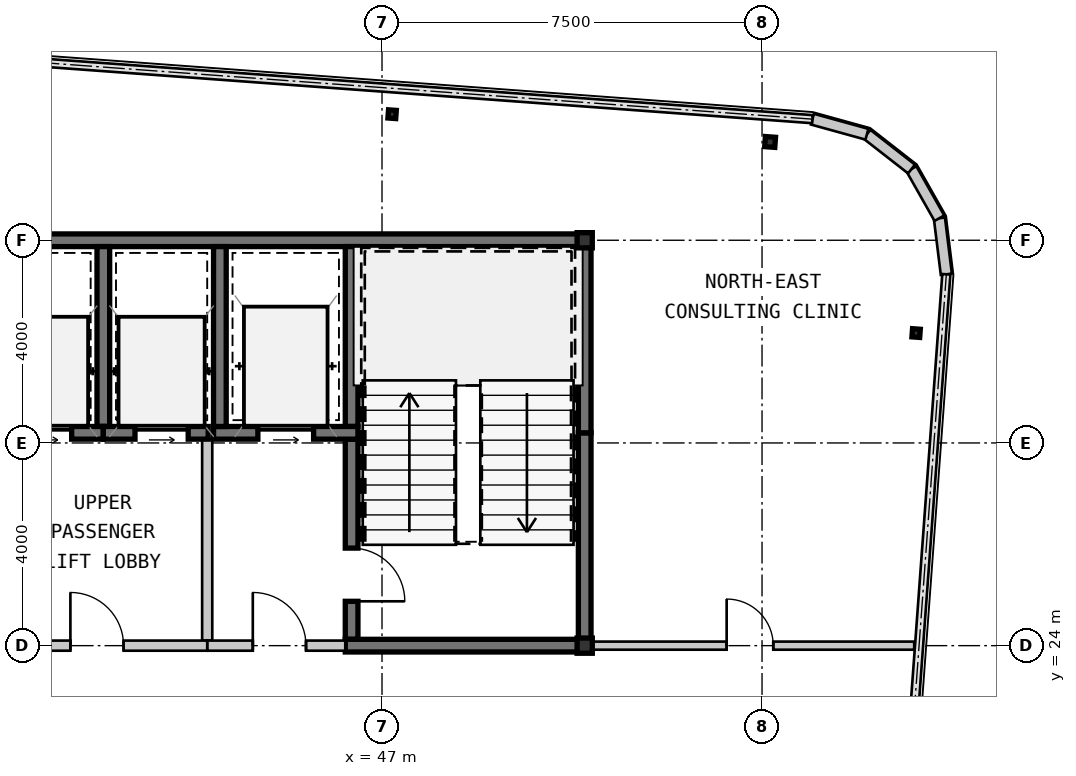
"""IFC4 building model, lengths in metres.
Left out: names, types, materials, properties, quantities, classifications, styles, units other than length and angle.
Written with IfcOpenShell. Run it as: python <this file> out.ifc"""

import sys

from ifc_helpers import new_model, si_unit, direction, frame, frame_2d, origin, origin_2d, place, context, subcontext, project, spatial, rectangle, hollow_rectangle, i_section, extrude, source, transform, mapped, element, fill, save


model = new_model("IFC4")
c1 = context("Model", 3, precision=1e-05, world=origin(), true_north=direction((0.0, 1.0)))
c2 = subcontext(c1, "Body", "Model", "MODEL_VIEW")
j1 = project(units=[si_unit("LENGTHUNIT", "METRE"), si_unit("PLANEANGLEUNIT", "RADIAN")], contexts=[c1])
p1 = place(None, origin())
s1 = spatial("IfcSite", under=j1, at=p1, CompositionType="ELEMENT")
p2 = place(p1, origin())
s2 = spatial("IfcBuilding", under=s1, at=p2, CompositionType="ELEMENT")
p3 = place(p2, frame((0.0, 0.0, 220.85)))
s3 = spatial("IfcBuildingStorey", under=s2, at=p3, CompositionType="ELEMENT", Elevation=220.85)
m1 = source(origin(), c2, "Body", "SweptSolid", [
    extrude(hollow_rectangle(XDim=0.3, YDim=0.3, WallThickness=0.012, at=origin_2d()), origin(), (0.0, 0.0, 1.0), 3.15),
])
for number, where, z_axis, x_axis in (
    (1, (51.0, 24.0, 0.0), (0.0, 0.0, 1.0), (1.0, 0.0, 0.0)),
    (2, (51.0, 32.0, 0.0), (0.0, 0.0, 1.0), (1.0, 0.0, 0.0)),
):
    element("IfcColumn", number, at=place(p3, frame(where, z_axis=z_axis, x_axis=x_axis)), inside=s3, PredefinedType="COLUMN", context=c2, shape_type="MappedRepresentation", body=[
        mapped(m1, transform((0.0, 0.0, 0.0), scale=1.0)),
    ])
m2 = source(origin(), c2, "Body", "SweptSolid", [
    extrude(i_section(OverallWidth=0.154, OverallDepth=0.162, WebThickness=0.008, FlangeThickness=0.011, at=origin_2d()), origin(), (0.0, 0.0, 1.0), 3.15),
])
p4 = place(p3, frame((47.199, 34.488, 0.0), z_axis=(0.0, 0.0, 1.0), x_axis=(0.997314477224, -0.073238197128, 0.0)))
e3 = element("IfcColumn", 3, at=p4, inside=s3, PredefinedType="COLUMN", context=c2, shape_type="MappedRepresentation", body=[
    mapped(m2, transform((0.0, 0.0, 0.0), scale=1.0)),
])
m3 = source(origin(), c2, "Body", "SweptSolid", [
    extrude(hollow_rectangle(XDim=0.2, YDim=0.2, WallThickness=0.009, at=origin_2d()), origin(), (0.0, 0.0, 1.0), 3.15),
])
p5 = place(p3, frame((54.659, 33.94, 0.0), z_axis=(0.0, 0.0, 1.0), x_axis=(0.997314477224, -0.073238197128, 0.0)))
e4 = element("IfcColumn", 4, at=p5, inside=s3, PredefinedType="COLUMN", context=c2, shape_type="MappedRepresentation", body=[
    mapped(m3, transform((0.0, 0.0, 0.0), scale=1.0)),
])
p6 = place(p3, frame((57.541, 30.169, 0.0), z_axis=(0.0, 0.0, 1.0), x_axis=(0.997314477224, -0.073238197128, 0.0)))
e5 = element("IfcColumn", 5, at=p6, inside=s3, PredefinedType="COLUMN", context=c2, shape_type="MappedRepresentation", body=[
    mapped(m2, transform((0.0, 0.0, 0.0), scale=1.0)),
])
m4 = source(origin(), c2, "Body", "SweptSolid", [
    extrude(rectangle(XDim=1.116, YDim=0.22, at=frame_2d((0.558, 0.0))), origin(), (0.0, 0.0, 1.0), 2.93),
])
p7 = place(p3, frame((58.137, 31.328, 0.0), z_axis=(0.0, 0.0, 1.0), x_axis=(-0.122742076028, 0.992438604032, 0.0)))
e6 = element("IfcWall", 6, at=p7, inside=s3, PredefinedType="SOLIDWALL", context=c2, shape_type="MappedRepresentation", body=[
    mapped(m4, transform((0.0, 0.0, 0.0), scale=1.0)),
])
m5 = source(origin(), c2, "Body", "SweptSolid", [
    extrude(rectangle(XDim=1.116, YDim=0.22, at=frame_2d((0.558, 0.0))), origin(), (0.0, 0.0, 1.0), 2.93),
])
p8 = place(p3, frame((58.0, 32.436, 0.0), z_axis=(0.0, 0.0, 1.0), x_axis=(-0.493167138628, 0.869934579941, 0.0)))
e7 = element("IfcWall", 7, at=p8, inside=s3, PredefinedType="SOLIDWALL", context=c2, shape_type="MappedRepresentation", body=[
    mapped(m5, transform((0.0, 0.0, 0.0), scale=1.0)),
])
p9 = place(p3, frame((57.45, 33.406, 0.0), z_axis=(0.0, 0.0, 1.0), x_axis=(-0.788597772321, 0.614909386406, 0.0)))
e8 = element("IfcWall", 8, at=p9, inside=s3, PredefinedType="SOLIDWALL", context=c2, shape_type="MappedRepresentation", body=[
    mapped(m4, transform((0.0, 0.0, 0.0), scale=1.0)),
])
p10 = place(p3, frame((56.57, 34.093, 0.0), z_axis=(0.0, 0.0, 1.0), x_axis=(-0.963833843713, 0.266503886865, 0.0)))
e9 = element("IfcWall", 9, at=p10, inside=s3, PredefinedType="SOLIDWALL", context=c2, shape_type="MappedRepresentation", body=[
    mapped(m5, transform((0.0, 0.0, 0.0), scale=1.0)),
])
m6 = source(origin(), c2, "Body", "SweptSolid", [
    extrude(rectangle(XDim=11.925, YDim=0.25, at=frame_2d((5.962, 0.0))), origin(), (0.0, 0.0, 1.0), 2.93),
])
p11 = place(p3, frame((39.2, 32.0, 0.0), z_axis=(0.0, 0.0, 1.0), x_axis=(1.0, 0.0, 0.0)))
e10 = element("IfcWall", 10, at=p11, inside=s3, PredefinedType="SHEAR", context=c2, shape_type="MappedRepresentation", body=[
    mapped(m6, transform((0.0, 0.0, 0.0), scale=1.0)),
])
m7 = source(origin(), c2, "Body", "SweptSolid", [
    extrude(rectangle(XDim=4.075, YDim=0.25, at=frame_2d((2.038, 0.0))), origin(), (0.0, 0.0, 1.0), 2.93),
])
p12 = place(p3, frame((51.0, 24.125, 0.0), z_axis=(0.0, 0.0, 1.0), x_axis=(0.0, 1.0, 0.0)))
e11 = element("IfcWall", 11, at=p12, inside=s3, PredefinedType="SHEAR", context=c2, shape_type="MappedRepresentation", body=[
    mapped(m7, transform((0.0, 0.0, 0.0), scale=1.0)),
])
m8 = source(origin(), c2, "Body", "SweptSolid", [
    extrude(rectangle(XDim=3.675, YDim=0.25, at=frame_2d((1.837, 0.0))), origin(), (0.0, 0.0, 1.0), 2.93),
])
p13 = place(p3, frame((51.0, 28.2, 0.0), z_axis=(0.0, 0.0, 1.0), x_axis=(0.0, 1.0, 0.0)))
e12 = element("IfcWall", 12, at=p13, inside=s3, PredefinedType="SHEAR", context=c2, shape_type="MappedRepresentation", body=[
    mapped(m8, transform((0.0, 0.0, 0.0), scale=1.0)),
])
m9 = source(origin(), c2, "Body", "SweptSolid", [
    extrude(rectangle(XDim=3.55, YDim=0.25, at=frame_2d((1.775, 0.0))), origin(), (0.0, 0.0, 1.0), 2.93),
])
p14 = place(p3, frame((46.4, 31.875, 0.0), z_axis=(0.0, 0.0, 1.0), x_axis=(0.0, -1.0, 0.0)))
e13 = element("IfcWall", 13, at=p14, inside=s3, PredefinedType="SHEAR", context=c2, shape_type="MappedRepresentation", body=[
    mapped(m9, transform((0.0, 0.0, 0.0), scale=1.0)),
])
m10 = source(origin(), c2, "Body", "SweptSolid", [
    extrude(rectangle(XDim=3.95, YDim=0.25, at=frame_2d((1.975, 0.0))), origin(), (0.0, 0.0, 1.0), 2.93),
])
p15 = place(p3, frame((46.4, 28.075, 0.0), z_axis=(0.0, 0.0, 1.0), x_axis=(0.0, -1.0, 0.0)))
e14 = element("IfcWall", 14, at=p15, inside=s3, PredefinedType="SHEAR", context=c2, shape_type="MappedRepresentation", body=[
    mapped(m10, transform((0.0, 0.0, 0.0), scale=1.0)),
])
m11 = source(origin(), c2, "Body", "SweptSolid", [
    extrude(rectangle(XDim=1.05, YDim=2.1, at=frame_2d((0.525, 1.05))), frame((0.0, 0.135, 0.0), z_axis=(0.0, -1.0, 0.0), x_axis=(1.0, 0.0, 0.0)), (0.0, 0.0, 1.0), 0.27),
])
p16 = place(p15, frame((2.15, 0.0, 0.0)))
e15 = element("IfcOpeningElement", 15, at=p16, cuts=e14, PredefinedType="OPENING", context=c2, shape_type="MappedRepresentation", body=[
    mapped(m11, transform((0.0, 0.0, 0.0), scale=1.0)),
])
m12 = source(origin(), c2, "Body", "SweptSolid", [
    extrude(rectangle(XDim=4.85, YDim=0.25, at=frame_2d((2.425, 0.0))), origin(), (0.0, 0.0, 1.0), 2.93),
])
p17 = place(p3, frame((46.275, 24.0, 0.0), z_axis=(0.0, 0.0, 1.0), x_axis=(1.0, 0.0, 0.0)))
e16 = element("IfcWall", 16, at=p17, inside=s3, PredefinedType="SHEAR", context=c2, shape_type="MappedRepresentation", body=[
    mapped(m12, transform((0.0, 0.0, 0.0), scale=1.0)),
])
m13 = source(origin(), c2, "Body", "SweptSolid", [
    extrude(rectangle(XDim=2.85, YDim=0.25, at=frame_2d((1.425, 0.0))), origin(), (0.0, 0.0, 1.0), 2.93),
])
p18 = place(p3, frame((43.675, 28.2, 0.0), z_axis=(0.0, 0.0, 1.0), x_axis=(1.0, 0.0, 0.0)))
e17 = element("IfcWall", 17, at=p18, inside=s3, PredefinedType="SHEAR", context=c2, shape_type="MappedRepresentation", body=[
    mapped(m13, transform((0.0, 0.0, 0.0), scale=1.0)),
])
m14 = source(origin(), c2, "Body", "SweptSolid", [
    extrude(rectangle(XDim=1.1, YDim=2.15, at=frame_2d((0.55, 1.075))), frame((0.0, 0.135, 0.0), z_axis=(0.0, -1.0, 0.0), x_axis=(1.0, 0.0, 0.0)), (0.0, 0.0, 1.0), 0.27),
])
p19 = place(p18, frame((0.875, 0.0, 0.0)))
e18 = element("IfcOpeningElement", 18, at=p19, cuts=e17, PredefinedType="OPENING", context=c2, shape_type="MappedRepresentation", body=[
    mapped(m14, transform((0.0, 0.0, 0.0), scale=1.0)),
])
p20 = place(p3, frame((43.8, 31.875, 0.0), z_axis=(0.0, 0.0, 1.0), x_axis=(0.0, -1.0, 0.0)))
e19 = element("IfcWall", 19, at=p20, inside=s3, PredefinedType="SHEAR", context=c2, shape_type="MappedRepresentation", body=[
    mapped(m9, transform((0.0, 0.0, 0.0), scale=1.0)),
])
m15 = source(origin(), c2, "Body", "SweptSolid", [
    extrude(rectangle(XDim=3.975, YDim=0.2, at=frame_2d((1.987, 0.0))), origin(), (0.0, 0.0, 1.0), 2.93),
])
p21 = place(p3, frame((43.55, 28.075, 0.0), z_axis=(0.0, 0.0, 1.0), x_axis=(0.0, -1.0, 0.0)))
e20 = element("IfcWall", 20, at=p21, inside=s3, PredefinedType="SOLIDWALL", context=c2, shape_type="MappedRepresentation", body=[
    mapped(m15, transform((0.0, 0.0, 0.0), scale=1.0)),
])
m16 = source(origin(), c2, "Body", "SweptSolid", [
    extrude(rectangle(XDim=2.725, YDim=0.2, at=frame_2d((1.362, 0.0))), origin(), (0.0, 0.0, 1.0), 2.397),
])
p22 = place(p3, frame((43.55, 24.0, 0.0), z_axis=(0.0, 0.0, 1.0), x_axis=(1.0, 0.0, 0.0)))
e21 = element("IfcWall", 21, at=p22, inside=s3, PredefinedType="SOLIDWALL", context=c2, shape_type="MappedRepresentation", body=[
    mapped(m16, transform((0.0, 0.0, 0.0), scale=1.0)),
])
m17 = source(origin(), c2, "Body", "SweptSolid", [
    extrude(rectangle(XDim=1.05, YDim=2.1, at=frame_2d((0.525, 1.05))), frame((0.0, 0.11, 0.0), z_axis=(0.0, -1.0, 0.0), x_axis=(1.0, 0.0, 0.0)), (0.0, 0.0, 1.0), 0.22),
])
p23 = place(p22, frame((0.9, 0.0, 0.0)))
e22 = element("IfcOpeningElement", 22, at=p23, cuts=e21, PredefinedType="OPENING", context=c2, shape_type="MappedRepresentation", body=[
    mapped(m17, transform((0.0, 0.0, 0.0), scale=1.0)),
])
p24 = place(p3, frame((41.5, 28.325, 0.0), z_axis=(0.0, 0.0, 1.0), x_axis=(0.0, 1.0, 0.0)))
e23 = element("IfcWall", 23, at=p24, inside=s3, PredefinedType="SHEAR", context=c2, shape_type="MappedRepresentation", body=[
    mapped(m9, transform((0.0, 0.0, 0.0), scale=1.0)),
])
m18 = source(origin(), c2, "Body", "SweptSolid", [
    extrude(rectangle(XDim=2.425, YDim=0.25, at=frame_2d((1.212, 0.0))), origin(), (0.0, 0.0, 1.0), 2.93),
])
p25 = place(p3, frame((39.075, 28.2, 0.0), z_axis=(0.0, 0.0, 1.0), x_axis=(1.0, 0.0, 0.0)))
e24 = element("IfcWall", 24, at=p25, inside=s3, PredefinedType="SHEAR", context=c2, shape_type="MappedRepresentation", body=[
    mapped(m18, transform((0.0, 0.0, 0.0), scale=1.0)),
])
m19 = source(origin(), c2, "Body", "SweptSolid", [
    extrude(rectangle(XDim=1.05, YDim=2.15, at=frame_2d((0.525, 1.075))), frame((0.0, 0.135, 0.0), z_axis=(0.0, -1.0, 0.0), x_axis=(1.0, 0.0, 0.0)), (0.0, 0.0, 1.0), 0.27),
])
p26 = place(p25, frame((0.75, 0.0, 0.0)))
e25 = element("IfcOpeningElement", 25, at=p26, cuts=e24, PredefinedType="OPENING", context=c2, shape_type="MappedRepresentation", body=[
    mapped(m19, transform((0.0, 0.0, 0.0), scale=1.0)),
])
m20 = source(origin(), c2, "Body", "SweptSolid", [
    extrude(rectangle(XDim=2.07, YDim=0.25, at=frame_2d((1.035, 0.0))), origin(), (0.0, 0.0, 1.0), 2.93),
])
p27 = place(p3, frame((41.5, 28.2, 0.0), z_axis=(0.0, 0.0, 1.0), x_axis=(1.0, 0.0, 0.0)))
e26 = element("IfcWall", 26, at=p27, inside=s3, PredefinedType="SHEAR", context=c2, shape_type="MappedRepresentation", body=[
    mapped(m20, transform((0.0, 0.0, 0.0), scale=1.0)),
])
p28 = place(p27, frame((0.625, 0.0, 0.0)))
e27 = element("IfcOpeningElement", 27, at=p28, cuts=e26, PredefinedType="OPENING", context=c2, shape_type="MappedRepresentation", body=[
    mapped(m19, transform((0.0, 0.0, 0.0), scale=1.0)),
])
m21 = source(origin(), c2, "Body", "SweptSolid", [
    extrude(rectangle(XDim=4.35, YDim=0.2, at=frame_2d((2.175, 0.0))), origin(), (0.0, 0.0, 1.0), 2.397),
])
p29 = place(p3, frame((43.55, 24.0, 0.0), z_axis=(0.0, 0.0, 1.0), x_axis=(-1.0, 0.0, 0.0)))
e28 = element("IfcWall", 28, at=p29, inside=s3, PredefinedType="SOLIDWALL", context=c2, shape_type="MappedRepresentation", body=[
    mapped(m21, transform((0.0, 0.0, 0.0), scale=1.0)),
])
p30 = place(p29, frame((1.65, 0.0, 0.0)))
e29 = element("IfcOpeningElement", 29, at=p30, cuts=e28, PredefinedType="OPENING", context=c2, shape_type="MappedRepresentation", body=[
    mapped(m17, transform((0.0, 0.0, 0.0), scale=1.0)),
])
m22 = source(origin(), c2, "Body", "SweptSolid", [
    extrude(rectangle(XDim=6.378, YDim=0.16, at=frame_2d((3.189, 0.0))), origin(), (0.0, 0.0, 1.0), 2.93),
])
p31 = place(p3, frame((51.125, 24.0, 0.0), z_axis=(0.0, 0.0, 1.0), x_axis=(1.0, 0.0, 0.0)))
e30 = element("IfcWall", 30, at=p31, inside=s3, PredefinedType="PARTITIONING", context=c2, shape_type="MappedRepresentation", body=[
    mapped(m22, transform((0.0, 0.0, 0.0), scale=1.0)),
])
m23 = source(origin(), c2, "Body", "SweptSolid", [
    extrude(rectangle(XDim=0.92, YDim=2.1, at=frame_2d((0.46, 1.05))), frame((0.0, 0.09, 0.0), z_axis=(0.0, -1.0, 0.0), x_axis=(1.0, 0.0, 0.0)), (0.0, 0.0, 1.0), 0.18),
])
p32 = place(p31, frame((2.677, 0.0, 0.0)))
e31 = element("IfcOpeningElement", 31, at=p32, cuts=e30, PredefinedType="OPENING", context=c2, shape_type="MappedRepresentation", body=[
    mapped(m23, transform((0.0, 0.0, 0.0), scale=1.0)),
])
m24 = source(origin(), c2, "Body", "SweptSolid", [
    extrude(rectangle(XDim=1.05, YDim=2.1, at=frame_2d((0.525, 1.05))), frame((0.0, 0.025, 0.0), z_axis=(0.0, -1.0, 0.0), x_axis=(1.0, 0.0, 0.0)), (0.0, 0.0, 1.0), 0.05),
])
p33 = place(p16, origin())
e32 = element("IfcDoor", 32, at=p33, inside=s3, OperationType="SINGLE_SWING_RIGHT", PredefinedType="DOOR", context=c2, shape_type="MappedRepresentation", body=[
    mapped(m24, transform((0.0, 0.0, 0.0), scale=1.0)),
])
fill(e15, e32)
m25 = source(origin(), c2, "Body", "SweptSolid", [
    extrude(rectangle(XDim=1.1, YDim=2.15, at=frame_2d((0.55, 1.075))), frame((0.0, 0.025, 0.0), z_axis=(0.0, -1.0, 0.0), x_axis=(1.0, 0.0, 0.0)), (0.0, 0.0, 1.0), 0.05),
])
p34 = place(p19, origin())
e33 = element("IfcDoor", 33, at=p34, inside=s3, OperationType="SLIDING_TO_LEFT", PredefinedType="DOOR", context=c2, shape_type="MappedRepresentation", body=[
    mapped(m25, transform((0.0, 0.0, 0.0), scale=1.0)),
])
fill(e18, e33)
p35 = place(p23, origin())
e34 = element("IfcDoor", 34, at=p35, inside=s3, OperationType="SINGLE_SWING_LEFT", PredefinedType="DOOR", context=c2, shape_type="MappedRepresentation", body=[
    mapped(m24, transform((0.0, 0.0, 0.0), scale=1.0)),
])
fill(e22, e34)
m26 = source(origin(), c2, "Body", "SweptSolid", [
    extrude(rectangle(XDim=1.05, YDim=2.15, at=frame_2d((0.525, 1.075))), frame((0.0, 0.025, 0.0), z_axis=(0.0, -1.0, 0.0), x_axis=(1.0, 0.0, 0.0)), (0.0, 0.0, 1.0), 0.05),
])
p36 = place(p26, origin())
e35 = element("IfcDoor", 35, at=p36, inside=s3, OperationType="SLIDING_TO_LEFT", PredefinedType="DOOR", context=c2, shape_type="MappedRepresentation", body=[
    mapped(m26, transform((0.0, 0.0, 0.0), scale=1.0)),
])
fill(e25, e35)
p37 = place(p28, origin())
e36 = element("IfcDoor", 36, at=p37, inside=s3, OperationType="SLIDING_TO_LEFT", PredefinedType="DOOR", context=c2, shape_type="MappedRepresentation", body=[
    mapped(m26, transform((0.0, 0.0, 0.0), scale=1.0)),
])
fill(e27, e36)
p38 = place(p30, frame((1.05, 0.0, 0.0), z_axis=(0.0, 0.0, 1.0), x_axis=(-1.0, 0.0, 0.0)))
e37 = element("IfcDoor", 37, at=p38, inside=s3, OperationType="SINGLE_SWING_LEFT", PredefinedType="DOOR", context=c2, shape_type="MappedRepresentation", body=[
    mapped(m24, transform((0.0, 0.0, 0.0), scale=1.0)),
])
fill(e29, e37)
m27 = source(origin(), c2, "Body", "SweptSolid", [
    extrude(rectangle(XDim=0.92, YDim=2.1, at=frame_2d((0.46, 1.05))), frame((0.0, 0.025, 0.0), z_axis=(0.0, -1.0, 0.0), x_axis=(1.0, 0.0, 0.0)), (0.0, 0.0, 1.0), 0.05),
])
p39 = place(p32, origin())
e38 = element("IfcDoor", 38, at=p39, inside=s3, OperationType="SINGLE_SWING_LEFT", PredefinedType="DOOR", context=c2, shape_type="MappedRepresentation", body=[
    mapped(m27, transform((0.0, 0.0, 0.0), scale=1.0)),
])
fill(e31, e38)
save(model, sys.argv[1])
